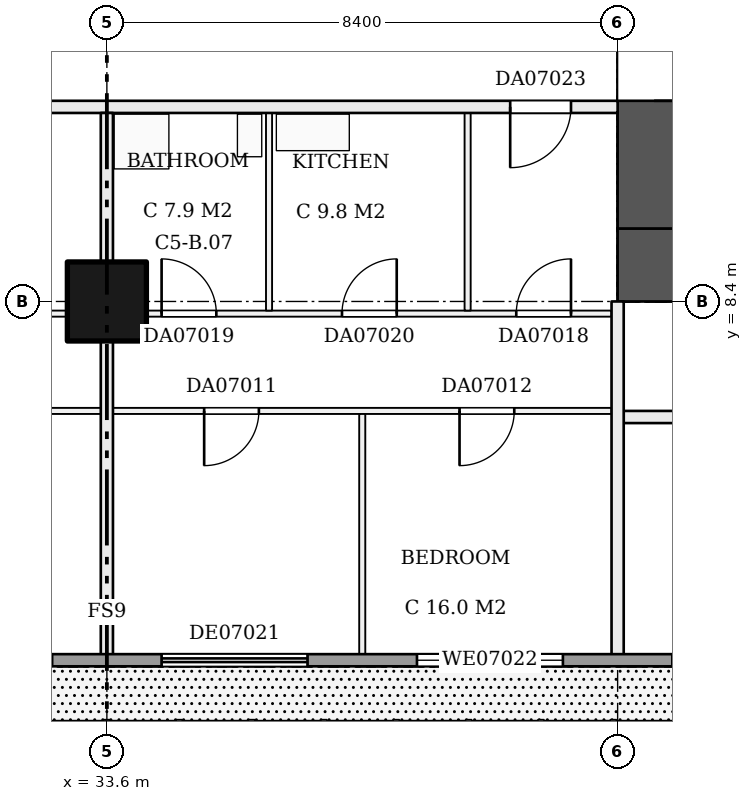
"""IFC4 building model, lengths in metres.
Left out: names, types, materials, properties, quantities, classifications, styles, units other than length and angle.
Written with IfcOpenShell. Run it as: python <this file> out.ifc"""

import sys

from ifc_helpers import new_model, si_unit, direction, frame, frame_2d, origin, origin_2d, place, context, subcontext, project, spatial, rectangle, extrude, element, fill, save


model = new_model("IFC4")
c1 = context("Model", 3, precision=1e-05, world=origin(), true_north=direction((0.0, 1.0)))
c2 = subcontext(c1, "Body", "Model", "MODEL_VIEW")
j1 = project(units=[si_unit("LENGTHUNIT", "METRE"), si_unit("PLANEANGLEUNIT", "RADIAN")], contexts=[c1])
p1 = place(None, origin())
s1 = spatial("IfcSite", under=j1, at=p1, CompositionType="ELEMENT")
p2 = place(p1, origin())
s2 = spatial("IfcBuilding", under=s1, at=p2, CompositionType="ELEMENT")
p3 = place(p2, frame((0.0, 0.0, 35.7)))
s3 = spatial("IfcBuildingStorey", under=s2, at=p3, CompositionType="ELEMENT", Elevation=35.7)
p4 = place(p3, frame((33.6, 8.4, 0.0), z_axis=(0.0, 0.0, 1.0), x_axis=(1.0, 0.0, 0.0)))
e1 = element("IfcColumn", 1, at=p4, inside=s3, PredefinedType="COLUMN", context=c2, shape_type="SweptSolid", body=[
    extrude(rectangle(XDim=1.3, YDim=1.3, at=origin_2d()), origin(), (0.0, 0.0, 1.0), 3.22),
])
p5 = place(p3, frame((42.0, 9.0, 0.0), z_axis=(0.0, 0.0, 1.0), x_axis=(1.0, 0.0, 0.0)))
e2 = element("IfcWall", 2, at=p5, inside=s3, PredefinedType="SHEAR", context=c2, shape_type="SweptSolid", body=[
    extrude(rectangle(XDim=16.8, YDim=1.2, at=frame_2d((8.4, 0.0))), origin(), (0.0, 0.0, 1.0), 3.22),
])
p6 = place(p5, frame((3.1, 0.0, 0.0)))
e3 = element("IfcOpeningElement", 3, at=p6, cuts=e2, PredefinedType="OPENING", context=c2, shape_type="SweptSolid", body=[
    extrude(rectangle(XDim=1.0, YDim=2.1, at=frame_2d((0.5, 1.05))), frame((0.0, 0.61, 0.0), z_axis=(0.0, -1.0, 0.0), x_axis=(1.0, 0.0, 0.0)), (0.0, 0.0, 1.0), 1.22),
])
p7 = place(p5, frame((12.7, 0.0, 0.0)))
e4 = element("IfcOpeningElement", 4, at=p7, cuts=e2, PredefinedType="OPENING", context=c2, shape_type="SweptSolid", body=[
    extrude(rectangle(XDim=1.0, YDim=2.1, at=frame_2d((0.5, 1.05))), frame((0.0, 0.61, 0.0), z_axis=(0.0, -1.0, 0.0), x_axis=(1.0, 0.0, 0.0)), (0.0, 0.0, 1.0), 1.22),
])
p8 = place(p3, frame((42.6, 9.6, 0.0), z_axis=(0.0, 0.0, 1.0), x_axis=(0.0, 1.0, 0.0)))
e5 = element("IfcWall", 5, at=p8, inside=s3, PredefinedType="SHEAR", context=c2, shape_type="SweptSolid", body=[
    extrude(rectangle(XDim=14.4, YDim=1.2, at=frame_2d((7.2, 0.0))), origin(), (0.0, 0.0, 1.0), 3.22),
])
p9 = place(p8, frame((2.1, 0.0, 0.0)))
e6 = element("IfcOpeningElement", 6, at=p9, cuts=e5, PredefinedType="OPENING", context=c2, shape_type="SweptSolid", body=[
    extrude(rectangle(XDim=1.8, YDim=2.1, at=frame_2d((0.9, 1.05))), frame((0.0, 0.61, 0.0), z_axis=(0.0, -1.0, 0.0), x_axis=(1.0, 0.0, 0.0)), (0.0, 0.0, 1.0), 1.22),
])
p10 = place(p3, frame((42.1, 6.5, 0.0), z_axis=(0.0, 0.0, 1.0), x_axis=(1.0, 0.0, 0.0)))
e7 = element("IfcWall", 7, at=p10, inside=s3, PredefinedType="PARTITIONING", context=c2, shape_type="SweptSolid", body=[
    extrude(rectangle(XDim=18.7, YDim=0.2, at=frame_2d((9.35, 0.0))), origin(), (0.0, 0.0, 1.0), 3.22),
])
p11 = place(p10, frame((1.5, 0.0, 0.0)))
e8 = element("IfcOpeningElement", 8, at=p11, cuts=e7, PredefinedType="OPENING", context=c2, shape_type="SweptSolid", body=[
    extrude(rectangle(XDim=1.0, YDim=2.1, at=frame_2d((0.5, 1.05))), frame((0.0, 0.11, 0.0), z_axis=(0.0, -1.0, 0.0), x_axis=(1.0, 0.0, 0.0)), (0.0, 0.0, 1.0), 0.22),
])
p12 = place(p10, frame((5.7, 0.0, 0.0)))
e9 = element("IfcOpeningElement", 9, at=p12, cuts=e7, PredefinedType="OPENING", context=c2, shape_type="SweptSolid", body=[
    extrude(rectangle(XDim=1.0, YDim=2.1, at=frame_2d((0.5, 1.05))), frame((0.0, 0.11, 0.0), z_axis=(0.0, -1.0, 0.0), x_axis=(1.0, 0.0, 0.0)), (0.0, 0.0, 1.0), 0.22),
])
p13 = place(p10, frame((13.1, 0.0, 0.0)))
e10 = element("IfcOpeningElement", 10, at=p13, cuts=e7, PredefinedType="OPENING", context=c2, shape_type="SweptSolid", body=[
    extrude(rectangle(XDim=1.0, YDim=2.1, at=frame_2d((0.5, 1.05))), frame((0.0, 0.11, 0.0), z_axis=(0.0, -1.0, 0.0), x_axis=(1.0, 0.0, 0.0)), (0.0, 0.0, 1.0), 0.22),
])
p14 = place(p10, frame((17.1, 0.0, 0.0)))
e11 = element("IfcOpeningElement", 11, at=p14, cuts=e7, PredefinedType="OPENING", context=c2, shape_type="SweptSolid", body=[
    extrude(rectangle(XDim=1.0, YDim=2.1, at=frame_2d((0.5, 1.05))), frame((0.0, 0.11, 0.0), z_axis=(0.0, -1.0, 0.0), x_axis=(1.0, 0.0, 0.0)), (0.0, 0.0, 1.0), 0.22),
])
p15 = place(p3, frame((12.65, 6.6, 0.0), z_axis=(0.0, 0.0, 1.0), x_axis=(1.0, 0.0, 0.0)))
e12 = element("IfcWall", 12, at=p15, inside=s3, PredefinedType="PARTITIONING", context=c2, shape_type="SweptSolid", body=[
    extrude(rectangle(XDim=29.25, YDim=0.1, at=frame_2d((14.625, 0.0))), origin(), (0.0, 0.0, 1.0), 3.22),
])
p16 = place(p15, frame((1.65, 0.0, 0.0)))
e13 = element("IfcOpeningElement", 13, at=p16, cuts=e12, PredefinedType="OPENING", context=c2, shape_type="SweptSolid", body=[
    extrude(rectangle(XDim=0.9, YDim=2.1, at=frame_2d((0.45, 1.05))), frame((0.0, 0.06, 0.0), z_axis=(0.0, -1.0, 0.0), x_axis=(1.0, 0.0, 0.0)), (0.0, 0.0, 1.0), 0.12),
])
p17 = place(p15, frame((5.75, 0.0, 0.0)))
e14 = element("IfcOpeningElement", 14, at=p17, cuts=e12, PredefinedType="OPENING", context=c2, shape_type="SweptSolid", body=[
    extrude(rectangle(XDim=0.9, YDim=2.1, at=frame_2d((0.45, 1.05))), frame((0.0, 0.06, 0.0), z_axis=(0.0, -1.0, 0.0), x_axis=(1.0, 0.0, 0.0)), (0.0, 0.0, 1.0), 0.12),
])
p18 = place(p15, frame((11.15, 0.0, 0.0)))
e15 = element("IfcOpeningElement", 15, at=p18, cuts=e12, PredefinedType="OPENING", context=c2, shape_type="SweptSolid", body=[
    extrude(rectangle(XDim=0.9, YDim=2.1, at=frame_2d((0.45, 1.05))), frame((0.0, 0.06, 0.0), z_axis=(0.0, -1.0, 0.0), x_axis=(1.0, 0.0, 0.0)), (0.0, 0.0, 1.0), 0.12),
])
p19 = place(p15, frame((18.35, 0.0, 0.0)))
e16 = element("IfcOpeningElement", 16, at=p19, cuts=e12, PredefinedType="OPENING", context=c2, shape_type="SweptSolid", body=[
    extrude(rectangle(XDim=0.9, YDim=2.1, at=frame_2d((0.45, 1.05))), frame((0.0, 0.06, 0.0), z_axis=(0.0, -1.0, 0.0), x_axis=(1.0, 0.0, 0.0)), (0.0, 0.0, 1.0), 0.12),
])
p20 = place(p15, frame((22.55, 0.0, 0.0)))
e17 = element("IfcOpeningElement", 17, at=p20, cuts=e12, PredefinedType="OPENING", context=c2, shape_type="SweptSolid", body=[
    extrude(rectangle(XDim=0.9, YDim=2.1, at=frame_2d((0.45, 1.05))), frame((0.0, 0.06, 0.0), z_axis=(0.0, -1.0, 0.0), x_axis=(1.0, 0.0, 0.0)), (0.0, 0.0, 1.0), 0.12),
])
p21 = place(p15, frame((26.75, 0.0, 0.0)))
e18 = element("IfcOpeningElement", 18, at=p21, cuts=e12, PredefinedType="OPENING", context=c2, shape_type="SweptSolid", body=[
    extrude(rectangle(XDim=0.9, YDim=2.1, at=frame_2d((0.45, 1.05))), frame((0.0, 0.06, 0.0), z_axis=(0.0, -1.0, 0.0), x_axis=(1.0, 0.0, 0.0)), (0.0, 0.0, 1.0), 0.12),
])
p22 = place(p3, frame((12.65, 8.2, 0.0), z_axis=(0.0, 0.0, 1.0), x_axis=(1.0, 0.0, 0.0)))
e19 = element("IfcWall", 19, at=p22, inside=s3, PredefinedType="PARTITIONING", context=c2, shape_type="SweptSolid", body=[
    extrude(rectangle(XDim=29.25, YDim=0.1, at=frame_2d((14.625, 0.0))), origin(), (0.0, 0.0, 1.0), 3.22),
])
p23 = place(p22, frame((2.39, 0.0, 0.0)))
e20 = element("IfcOpeningElement", 20, at=p23, cuts=e19, PredefinedType="OPENING", context=c2, shape_type="SweptSolid", body=[
    extrude(rectangle(XDim=0.9, YDim=2.1, at=frame_2d((0.45, 1.05))), frame((0.0, 0.06, 0.0), z_axis=(0.0, -1.0, 0.0), x_axis=(1.0, 0.0, 0.0)), (0.0, 0.0, 1.0), 0.12),
])
p24 = place(p22, frame((0.65, 0.0, 0.0)))
e21 = element("IfcOpeningElement", 21, at=p24, cuts=e19, PredefinedType="OPENING", context=c2, shape_type="SweptSolid", body=[
    extrude(rectangle(XDim=0.9, YDim=2.1, at=frame_2d((0.45, 1.05))), frame((0.0, 0.06, 0.0), z_axis=(0.0, -1.0, 0.0), x_axis=(1.0, 0.0, 0.0)), (0.0, 0.0, 1.0), 0.12),
])
p25 = place(p22, frame((17.883, 0.0, 0.0)))
e22 = element("IfcOpeningElement", 22, at=p25, cuts=e19, PredefinedType="OPENING", context=c2, shape_type="SweptSolid", body=[
    extrude(rectangle(XDim=0.9, YDim=2.1, at=frame_2d((0.45, 1.05))), frame((0.0, 0.06, 0.0), z_axis=(0.0, -1.0, 0.0), x_axis=(1.0, 0.0, 0.0)), (0.0, 0.0, 1.0), 0.12),
])
p26 = place(p22, frame((6.45, 0.0, 0.0)))
e23 = element("IfcOpeningElement", 23, at=p26, cuts=e19, PredefinedType="OPENING", context=c2, shape_type="SweptSolid", body=[
    extrude(rectangle(XDim=0.9, YDim=2.1, at=frame_2d((0.45, 1.05))), frame((0.0, 0.06, 0.0), z_axis=(0.0, -1.0, 0.0), x_axis=(1.0, 0.0, 0.0)), (0.0, 0.0, 1.0), 0.12),
])
p27 = place(p22, frame((13.417, 0.0, 0.0)))
e24 = element("IfcOpeningElement", 24, at=p27, cuts=e19, PredefinedType="OPENING", context=c2, shape_type="SweptSolid", body=[
    extrude(rectangle(XDim=0.9, YDim=2.1, at=frame_2d((0.45, 1.05))), frame((0.0, 0.06, 0.0), z_axis=(0.0, -1.0, 0.0), x_axis=(1.0, 0.0, 0.0)), (0.0, 0.0, 1.0), 0.12),
])
p28 = place(p22, frame((27.683, 0.0, 0.0)))
e25 = element("IfcOpeningElement", 25, at=p28, cuts=e19, PredefinedType="OPENING", context=c2, shape_type="SweptSolid", body=[
    extrude(rectangle(XDim=0.9, YDim=2.1, at=frame_2d((0.45, 1.05))), frame((0.0, 0.06, 0.0), z_axis=(0.0, -1.0, 0.0), x_axis=(1.0, 0.0, 0.0)), (0.0, 0.0, 1.0), 0.12),
])
p29 = place(p22, frame((21.85, 0.0, 0.0)))
e26 = element("IfcOpeningElement", 26, at=p29, cuts=e19, PredefinedType="OPENING", context=c2, shape_type="SweptSolid", body=[
    extrude(rectangle(XDim=0.9, YDim=2.1, at=frame_2d((0.45, 1.05))), frame((0.0, 0.06, 0.0), z_axis=(0.0, -1.0, 0.0), x_axis=(1.0, 0.0, 0.0)), (0.0, 0.0, 1.0), 0.12),
])
p30 = place(p22, frame((24.817, 0.0, 0.0)))
e27 = element("IfcOpeningElement", 27, at=p30, cuts=e19, PredefinedType="OPENING", context=c2, shape_type="SweptSolid", body=[
    extrude(rectangle(XDim=0.9, YDim=2.1, at=frame_2d((0.45, 1.05))), frame((0.0, 0.06, 0.0), z_axis=(0.0, -1.0, 0.0), x_axis=(1.0, 0.0, 0.0)), (0.0, 0.0, 1.0), 0.12),
])
p31 = place(p3, frame((11.5, 11.6, 0.0), z_axis=(0.0, 0.0, 1.0), x_axis=(1.0, 0.0, 0.0)))
e28 = element("IfcWall", 28, at=p31, inside=s3, PredefinedType="PARTITIONING", context=c2, shape_type="SweptSolid", body=[
    extrude(rectangle(XDim=30.5, YDim=0.2, at=frame_2d((15.25, 0.0))), origin(), (0.0, 0.0, 1.0), 3.22),
])
p32 = place(p31, frame((3.84, 0.0, 0.0)))
e29 = element("IfcOpeningElement", 29, at=p32, cuts=e28, PredefinedType="OPENING", context=c2, shape_type="SweptSolid", body=[
    extrude(rectangle(XDim=1.0, YDim=2.1, at=frame_2d((0.5, 1.05))), frame((0.0, 0.11, 0.0), z_axis=(0.0, -1.0, 0.0), x_axis=(1.0, 0.0, 0.0)), (0.0, 0.0, 1.0), 0.22),
])
p33 = place(p31, frame((18.933, 0.0, 0.0)))
e30 = element("IfcOpeningElement", 30, at=p33, cuts=e28, PredefinedType="OPENING", context=c2, shape_type="SweptSolid", body=[
    extrude(rectangle(XDim=1.0, YDim=2.1, at=frame_2d((0.5, 1.05))), frame((0.0, 0.11, 0.0), z_axis=(0.0, -1.0, 0.0), x_axis=(1.0, 0.0, 0.0)), (0.0, 0.0, 1.0), 0.22),
])
p34 = place(p31, frame((28.733, 0.0, 0.0)))
e31 = element("IfcOpeningElement", 31, at=p34, cuts=e28, PredefinedType="OPENING", context=c2, shape_type="SweptSolid", body=[
    extrude(rectangle(XDim=1.0, YDim=2.1, at=frame_2d((0.5, 1.05))), frame((0.0, 0.11, 0.0), z_axis=(0.0, -1.0, 0.0), x_axis=(1.0, 0.0, 0.0)), (0.0, 0.0, 1.0), 0.22),
])
p35 = place(p3, frame((33.6, 2.5, 0.0), z_axis=(0.0, 0.0, 1.0), x_axis=(0.0, 1.0, 0.0)))
e32 = element("IfcWall", 32, at=p35, inside=s3, PredefinedType="PARTITIONING", context=c2, shape_type="SweptSolid", body=[
    extrude(rectangle(XDim=9.0, YDim=0.2, at=frame_2d((4.5, 0.0))), origin(), (0.0, 0.0, 1.0), 3.22),
])
p36 = place(p3, frame((36.267, 8.25, 0.0), z_axis=(0.0, 0.0, 1.0), x_axis=(0.0, 1.0, 0.0)))
e33 = element("IfcWall", 33, at=p36, inside=s3, PredefinedType="PARTITIONING", context=c2, shape_type="SweptSolid", body=[
    extrude(rectangle(XDim=3.25, YDim=0.1, at=frame_2d((1.625, 0.0))), origin(), (0.0, 0.0, 1.0), 3.22),
])
p37 = place(p3, frame((37.8, 2.5, 0.0), z_axis=(0.0, 0.0, 1.0), x_axis=(0.0, 1.0, 0.0)))
e34 = element("IfcWall", 34, at=p37, inside=s3, PredefinedType="PARTITIONING", context=c2, shape_type="SweptSolid", body=[
    extrude(rectangle(XDim=4.05, YDim=0.1, at=frame_2d((2.025, 0.0))), origin(), (0.0, 0.0, 1.0), 3.22),
])
p38 = place(p3, frame((39.533, 8.25, 0.0), z_axis=(0.0, 0.0, 1.0), x_axis=(0.0, 1.0, 0.0)))
e35 = element("IfcWall", 35, at=p38, inside=s3, PredefinedType="PARTITIONING", context=c2, shape_type="SweptSolid", body=[
    extrude(rectangle(XDim=3.25, YDim=0.1, at=frame_2d((1.625, 0.0))), origin(), (0.0, 0.0, 1.0), 3.22),
])
p39 = place(p3, frame((42.0, 2.5, 0.0), z_axis=(0.0, 0.0, 1.0), x_axis=(0.0, 1.0, 0.0)))
e36 = element("IfcWall", 36, at=p39, inside=s3, PredefinedType="PARTITIONING", context=c2, shape_type="SweptSolid", body=[
    extrude(rectangle(XDim=5.9, YDim=0.2, at=frame_2d((2.95, 0.0))), origin(), (0.0, 0.0, 1.0), 3.22),
])
p40 = place(p3, frame((4.8, 2.5, 0.0), z_axis=(0.0, 0.0, 1.0), x_axis=(1.0, 0.0, 0.0)))
e37 = element("IfcWall", 37, at=p40, inside=s3, PredefinedType="SOLIDWALL", context=c2, shape_type="SweptSolid", body=[
    extrude(rectangle(XDim=57.6, YDim=0.2, at=frame_2d((28.8, 0.0))), origin(), (0.0, 0.0, 1.0), 3.22),
])
p41 = place(p40, frame((0.3, 0.0, 0.0)))
e38 = element("IfcOpeningElement", 38, at=p41, cuts=e37, PredefinedType="OPENING", context=c2, shape_type="SweptSolid", body=[
    extrude(rectangle(XDim=2.4, YDim=2.2, at=frame_2d((1.2, 1.1))), frame((0.0, 0.11, 0.0), z_axis=(0.0, -1.0, 0.0), x_axis=(1.0, 0.0, 0.0)), (0.0, 0.0, 1.0), 0.22),
])
p42 = place(p40, frame((4.5, 0.0, 0.9)))
e39 = element("IfcOpeningElement", 39, at=p42, cuts=e37, PredefinedType="OPENING", context=c2, shape_type="SweptSolid", body=[
    extrude(rectangle(XDim=2.4, YDim=1.5, at=frame_2d((1.2, 0.75))), frame((0.0, 0.11, 0.0), z_axis=(0.0, -1.0, 0.0), x_axis=(1.0, 0.0, 0.0)), (0.0, 0.0, 1.0), 0.22),
])
p43 = place(p40, frame((8.7, 0.0, 0.9)))
e40 = element("IfcOpeningElement", 40, at=p43, cuts=e37, PredefinedType="OPENING", context=c2, shape_type="SweptSolid", body=[
    extrude(rectangle(XDim=2.4, YDim=1.5, at=frame_2d((1.2, 0.75))), frame((0.0, 0.11, 0.0), z_axis=(0.0, -1.0, 0.0), x_axis=(1.0, 0.0, 0.0)), (0.0, 0.0, 1.0), 0.22),
])
p44 = place(p40, frame((12.9, 0.0, 0.9)))
e41 = element("IfcOpeningElement", 41, at=p44, cuts=e37, PredefinedType="OPENING", context=c2, shape_type="SweptSolid", body=[
    extrude(rectangle(XDim=2.4, YDim=1.5, at=frame_2d((1.2, 0.75))), frame((0.0, 0.11, 0.0), z_axis=(0.0, -1.0, 0.0), x_axis=(1.0, 0.0, 0.0)), (0.0, 0.0, 1.0), 0.22),
])
p45 = place(p40, frame((17.1, 0.0, 0.0)))
e42 = element("IfcOpeningElement", 42, at=p45, cuts=e37, PredefinedType="OPENING", context=c2, shape_type="SweptSolid", body=[
    extrude(rectangle(XDim=2.4, YDim=2.2, at=frame_2d((1.2, 1.1))), frame((0.0, 0.11, 0.0), z_axis=(0.0, -1.0, 0.0), x_axis=(1.0, 0.0, 0.0)), (0.0, 0.0, 1.0), 0.22),
])
p46 = place(p40, frame((21.3, 0.0, 0.0)))
e43 = element("IfcOpeningElement", 43, at=p46, cuts=e37, PredefinedType="OPENING", context=c2, shape_type="SweptSolid", body=[
    extrude(rectangle(XDim=2.4, YDim=2.2, at=frame_2d((1.2, 1.1))), frame((0.0, 0.11, 0.0), z_axis=(0.0, -1.0, 0.0), x_axis=(1.0, 0.0, 0.0)), (0.0, 0.0, 1.0), 0.22),
])
p47 = place(p40, frame((25.5, 0.0, 0.9)))
e44 = element("IfcOpeningElement", 44, at=p47, cuts=e37, PredefinedType="OPENING", context=c2, shape_type="SweptSolid", body=[
    extrude(rectangle(XDim=2.4, YDim=1.5, at=frame_2d((1.2, 0.75))), frame((0.0, 0.11, 0.0), z_axis=(0.0, -1.0, 0.0), x_axis=(1.0, 0.0, 0.0)), (0.0, 0.0, 1.0), 0.22),
])
p48 = place(p40, frame((29.7, 0.0, 0.0)))
e45 = element("IfcOpeningElement", 45, at=p48, cuts=e37, PredefinedType="OPENING", context=c2, shape_type="SweptSolid", body=[
    extrude(rectangle(XDim=2.4, YDim=2.2, at=frame_2d((1.2, 1.1))), frame((0.0, 0.11, 0.0), z_axis=(0.0, -1.0, 0.0), x_axis=(1.0, 0.0, 0.0)), (0.0, 0.0, 1.0), 0.22),
])
p49 = place(p40, frame((33.9, 0.0, 0.9)))
e46 = element("IfcOpeningElement", 46, at=p49, cuts=e37, PredefinedType="OPENING", context=c2, shape_type="SweptSolid", body=[
    extrude(rectangle(XDim=2.4, YDim=1.5, at=frame_2d((1.2, 0.75))), frame((0.0, 0.11, 0.0), z_axis=(0.0, -1.0, 0.0), x_axis=(1.0, 0.0, 0.0)), (0.0, 0.0, 1.0), 0.22),
])
p50 = place(p40, frame((38.1, 0.0, 0.9)))
e47 = element("IfcOpeningElement", 47, at=p50, cuts=e37, PredefinedType="OPENING", context=c2, shape_type="SweptSolid", body=[
    extrude(rectangle(XDim=2.4, YDim=1.5, at=frame_2d((1.2, 0.75))), frame((0.0, 0.11, 0.0), z_axis=(0.0, -1.0, 0.0), x_axis=(1.0, 0.0, 0.0)), (0.0, 0.0, 1.0), 0.22),
])
p51 = place(p40, frame((42.3, 0.0, 0.9)))
e48 = element("IfcOpeningElement", 48, at=p51, cuts=e37, PredefinedType="OPENING", context=c2, shape_type="SweptSolid", body=[
    extrude(rectangle(XDim=2.4, YDim=1.5, at=frame_2d((1.2, 0.75))), frame((0.0, 0.11, 0.0), z_axis=(0.0, -1.0, 0.0), x_axis=(1.0, 0.0, 0.0)), (0.0, 0.0, 1.0), 0.22),
])
p52 = place(p40, frame((46.5, 0.0, 0.0)))
e49 = element("IfcOpeningElement", 49, at=p52, cuts=e37, PredefinedType="OPENING", context=c2, shape_type="SweptSolid", body=[
    extrude(rectangle(XDim=2.4, YDim=2.2, at=frame_2d((1.2, 1.1))), frame((0.0, 0.11, 0.0), z_axis=(0.0, -1.0, 0.0), x_axis=(1.0, 0.0, 0.0)), (0.0, 0.0, 1.0), 0.22),
])
p53 = place(p40, frame((50.7, 0.0, 0.9)))
e50 = element("IfcOpeningElement", 50, at=p53, cuts=e37, PredefinedType="OPENING", context=c2, shape_type="SweptSolid", body=[
    extrude(rectangle(XDim=2.4, YDim=1.5, at=frame_2d((1.2, 0.75))), frame((0.0, 0.11, 0.0), z_axis=(0.0, -1.0, 0.0), x_axis=(1.0, 0.0, 0.0)), (0.0, 0.0, 1.0), 0.22),
])
p54 = place(p40, frame((54.9, 0.0, 0.9)))
e51 = element("IfcOpeningElement", 51, at=p54, cuts=e37, PredefinedType="OPENING", context=c2, shape_type="SweptSolid", body=[
    extrude(rectangle(XDim=2.4, YDim=1.5, at=frame_2d((1.2, 0.75))), frame((0.0, 0.11, 0.0), z_axis=(0.0, -1.0, 0.0), x_axis=(1.0, 0.0, 0.0)), (0.0, 0.0, 1.0), 0.22),
])
p55 = place(p9, frame((1.8, 0.0, 0.0), z_axis=(0.0, 0.0, 1.0), x_axis=(-1.0, 0.0, 0.0)))
e52 = element("IfcDoor", 52, at=p55, inside=s3, OperationType="DOUBLE_DOOR_SINGLE_SWING", PredefinedType="DOOR", context=c2, shape_type="SweptSolid", body=[
    extrude(rectangle(XDim=1.8, YDim=2.1, at=frame_2d((0.9, 1.05))), frame((0.0, 0.025, 0.0), z_axis=(0.0, -1.0, 0.0), x_axis=(1.0, 0.0, 0.0)), (0.0, 0.0, 1.0), 0.05),
])
fill(e6, e52)
p56 = place(p20, frame((0.9, 0.0, 0.0), z_axis=(0.0, 0.0, 1.0), x_axis=(-1.0, 0.0, 0.0)))
e53 = element("IfcDoor", 53, at=p56, inside=s3, OperationType="SINGLE_SWING_RIGHT", PredefinedType="DOOR", context=c2, shape_type="SweptSolid", body=[
    extrude(rectangle(XDim=0.9, YDim=2.1, at=frame_2d((0.45, 1.05))), frame((0.0, 0.025, 0.0), z_axis=(0.0, -1.0, 0.0), x_axis=(1.0, 0.0, 0.0)), (0.0, 0.0, 1.0), 0.05),
])
fill(e17, e53)
p57 = place(p21, frame((0.9, 0.0, 0.0), z_axis=(0.0, 0.0, 1.0), x_axis=(-1.0, 0.0, 0.0)))
e54 = element("IfcDoor", 54, at=p57, inside=s3, OperationType="SINGLE_SWING_RIGHT", PredefinedType="DOOR", context=c2, shape_type="SweptSolid", body=[
    extrude(rectangle(XDim=0.9, YDim=2.1, at=frame_2d((0.45, 1.05))), frame((0.0, 0.025, 0.0), z_axis=(0.0, -1.0, 0.0), x_axis=(1.0, 0.0, 0.0)), (0.0, 0.0, 1.0), 0.05),
])
fill(e18, e54)
p58 = place(p28, origin())
e55 = element("IfcDoor", 55, at=p58, inside=s3, OperationType="SINGLE_SWING_RIGHT", PredefinedType="DOOR", context=c2, shape_type="SweptSolid", body=[
    extrude(rectangle(XDim=0.9, YDim=2.1, at=frame_2d((0.45, 1.05))), frame((0.0, 0.025, 0.0), z_axis=(0.0, -1.0, 0.0), x_axis=(1.0, 0.0, 0.0)), (0.0, 0.0, 1.0), 0.05),
])
fill(e25, e55)
p59 = place(p29, origin())
e56 = element("IfcDoor", 56, at=p59, inside=s3, OperationType="SINGLE_SWING_LEFT", PredefinedType="DOOR", context=c2, shape_type="SweptSolid", body=[
    extrude(rectangle(XDim=0.9, YDim=2.1, at=frame_2d((0.45, 1.05))), frame((0.0, 0.025, 0.0), z_axis=(0.0, -1.0, 0.0), x_axis=(1.0, 0.0, 0.0)), (0.0, 0.0, 1.0), 0.05),
])
fill(e26, e56)
p60 = place(p30, origin())
e57 = element("IfcDoor", 57, at=p60, inside=s3, OperationType="SINGLE_SWING_RIGHT", PredefinedType="DOOR", context=c2, shape_type="SweptSolid", body=[
    extrude(rectangle(XDim=0.9, YDim=2.1, at=frame_2d((0.45, 1.05))), frame((0.0, 0.025, 0.0), z_axis=(0.0, -1.0, 0.0), x_axis=(1.0, 0.0, 0.0)), (0.0, 0.0, 1.0), 0.05),
])
fill(e27, e57)
p61 = place(p34, frame((1.0, 0.0, 0.0), z_axis=(0.0, 0.0, 1.0), x_axis=(-1.0, 0.0, 0.0)))
e58 = element("IfcDoor", 58, at=p61, inside=s3, OperationType="SINGLE_SWING_RIGHT", PredefinedType="DOOR", context=c2, shape_type="SweptSolid", body=[
    extrude(rectangle(XDim=1.0, YDim=2.1, at=frame_2d((0.5, 1.05))), frame((0.0, 0.025, 0.0), z_axis=(0.0, -1.0, 0.0), x_axis=(1.0, 0.0, 0.0)), (0.0, 0.0, 1.0), 0.05),
])
fill(e31, e58)
p62 = place(p48, origin())
e59 = element("IfcDoor", 59, at=p62, inside=s3, OperationType="DOUBLE_DOOR_SLIDING", PredefinedType="DOOR", context=c2, shape_type="SweptSolid", body=[
    extrude(rectangle(XDim=2.4, YDim=2.2, at=frame_2d((1.2, 1.1))), frame((0.0, 0.025, 0.0), z_axis=(0.0, -1.0, 0.0), x_axis=(1.0, 0.0, 0.0)), (0.0, 0.0, 1.0), 0.05),
])
fill(e45, e59)
p63 = place(p49, origin())
e60 = element("IfcWindow", 60, at=p63, inside=s3, PartitioningType="SINGLE_PANEL", PredefinedType="WINDOW", context=c2, shape_type="SweptSolid", body=[
    extrude(rectangle(XDim=2.4, YDim=1.5, at=frame_2d((1.2, 0.75))), frame((0.0, 0.03, 0.0), z_axis=(0.0, -1.0, 0.0), x_axis=(1.0, 0.0, 0.0)), (0.0, 0.0, 1.0), 0.06),
])
fill(e46, e60)
save(model, sys.argv[1])
